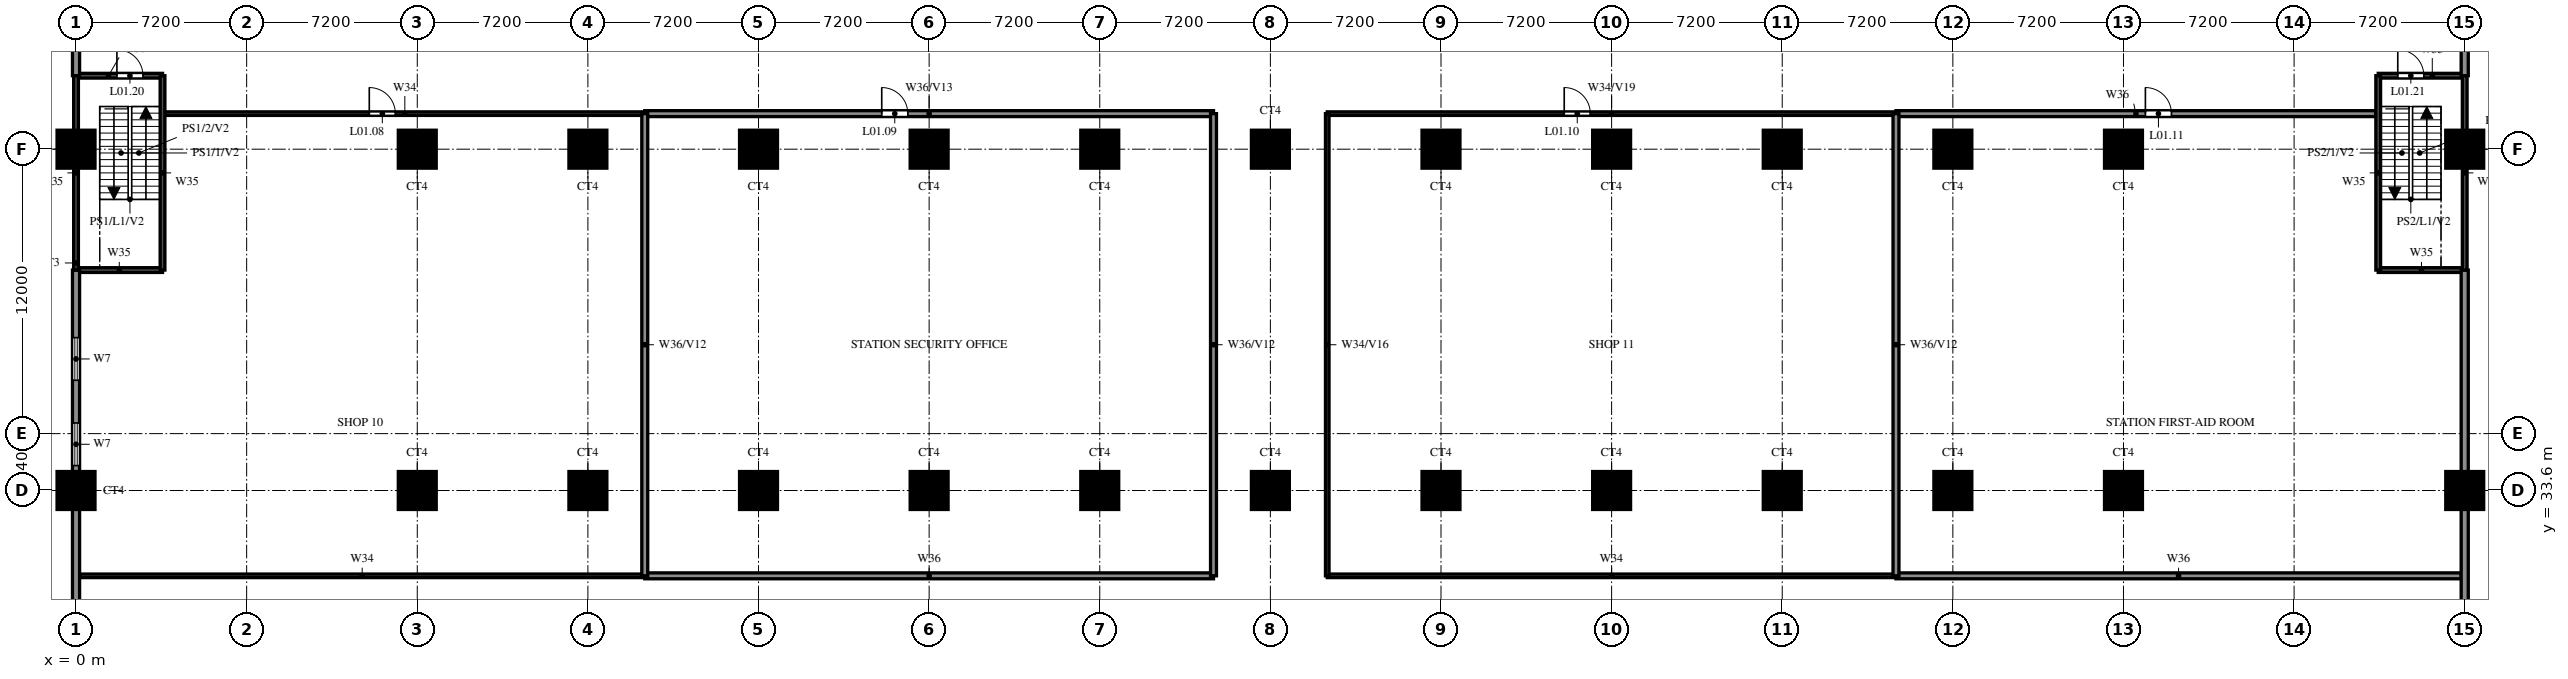
"""IFC4 building model, lengths in metres.
Left out: names, types, materials, properties, quantities, classifications, styles, units other than length and angle.
Written with IfcOpenShell. Run it as: python <this file> out.ifc"""

import sys

from ifc_helpers import new_model, si_unit, direction, frame, frame_2d, origin, origin_2d, place, context, subcontext, project, spatial, rectangle, circle, extrude, source, transform, mapped, element, fill, save


model = new_model("IFC4")
c1 = context("Model", 3, precision=1e-05, world=origin(), true_north=direction((0.0, 1.0)))
c2 = subcontext(c1, "Body", "Model", "MODEL_VIEW")
j1 = project(units=[si_unit("LENGTHUNIT", "METRE"), si_unit("PLANEANGLEUNIT", "RADIAN")], contexts=[c1])
p1 = place(None, origin())
s1 = spatial("IfcSite", under=j1, at=p1, CompositionType="ELEMENT")
p2 = place(p1, origin())
s2 = spatial("IfcBuilding", under=s1, at=p2, CompositionType="ELEMENT")
p3 = place(p2, frame((0.0, 0.0, 7.8)))
s3 = spatial("IfcBuildingStorey", under=s2, at=p3, CompositionType="ELEMENT", Elevation=7.8)
m1 = source(origin(), c2, "Body", "SweptSolid", [
    extrude(circle(Radius=0.8, at=origin_2d()), origin(), (0.0, 0.0, 1.0), 5.0),
])
for number, where, z_axis, x_axis in (
    (1, (0.0, 33.6, 0.0), (0.0, 0.0, 1.0), (1.0, 0.0, 0.0)),
    (2, (14.4, 33.6, 0.0), (0.0, 0.0, 1.0), (1.0, 0.0, 0.0)),
    (3, (21.6, 33.6, 0.0), (0.0, 0.0, 1.0), (1.0, 0.0, 0.0)),
    (4, (28.8, 33.6, 0.0), (0.0, 0.0, 1.0), (1.0, 0.0, 0.0)),
    (5, (36.0, 33.6, 0.0), (0.0, 0.0, 1.0), (1.0, 0.0, 0.0)),
    (6, (43.2, 33.6, 0.0), (0.0, 0.0, 1.0), (1.0, 0.0, 0.0)),
    (7, (50.4, 33.6, 0.0), (0.0, 0.0, 1.0), (1.0, 0.0, 0.0)),
    (8, (57.6, 33.6, 0.0), (0.0, 0.0, 1.0), (1.0, 0.0, 0.0)),
    (9, (64.8, 33.6, 0.0), (0.0, 0.0, 1.0), (1.0, 0.0, 0.0)),
    (10, (72.0, 33.6, 0.0), (0.0, 0.0, 1.0), (1.0, 0.0, 0.0)),
    (11, (79.2, 33.6, 0.0), (0.0, 0.0, 1.0), (1.0, 0.0, 0.0)),
    (12, (86.4, 33.6, 0.0), (0.0, 0.0, 1.0), (1.0, 0.0, 0.0)),
    (13, (100.8, 33.6, 0.0), (0.0, 0.0, 1.0), (1.0, 0.0, 0.0)),
    (14, (0.0, 48.0, 0.0), (0.0, 0.0, 1.0), (1.0, 0.0, 0.0)),
    (15, (14.4, 48.0, 0.0), (0.0, 0.0, 1.0), (1.0, 0.0, 0.0)),
    (16, (21.6, 48.0, 0.0), (0.0, 0.0, 1.0), (1.0, 0.0, 0.0)),
    (17, (28.8, 48.0, 0.0), (0.0, 0.0, 1.0), (1.0, 0.0, 0.0)),
    (18, (36.0, 48.0, 0.0), (0.0, 0.0, 1.0), (1.0, 0.0, 0.0)),
    (19, (43.2, 48.0, 0.0), (0.0, 0.0, 1.0), (1.0, 0.0, 0.0)),
    (20, (50.4, 48.0, 0.0), (0.0, 0.0, 1.0), (1.0, 0.0, 0.0)),
    (21, (57.6, 48.0, 0.0), (0.0, 0.0, 1.0), (1.0, 0.0, 0.0)),
    (22, (64.8, 48.0, 0.0), (0.0, 0.0, 1.0), (1.0, 0.0, 0.0)),
    (23, (72.0, 48.0, 0.0), (0.0, 0.0, 1.0), (1.0, 0.0, 0.0)),
    (24, (79.2, 48.0, 0.0), (0.0, 0.0, 1.0), (1.0, 0.0, 0.0)),
    (25, (86.4, 48.0, 0.0), (0.0, 0.0, 1.0), (1.0, 0.0, 0.0)),
    (26, (100.8, 48.0, 0.0), (0.0, 0.0, 1.0), (1.0, 0.0, 0.0)),
):
    element("IfcColumn", number, at=place(p3, frame(where, z_axis=z_axis, x_axis=x_axis)), inside=s3, PredefinedType="COLUMN", context=c2, shape_type="MappedRepresentation", body=[
        mapped(m1, transform((0.0, 0.0, 0.0))),
    ])
p4 = place(p3, frame((0.15, 30.0, 0.0), z_axis=(0.0, 0.0, 1.0), x_axis=(1.0, 0.0, 0.0)))
e27 = element("IfcWall", 27, at=p4, inside=s3, PredefinedType="PARTITIONING", context=c2, shape_type="SweptSolid", body=[
    extrude(rectangle(XDim=23.85, YDim=0.15, at=frame_2d((11.925, 0.0))), origin(), (0.0, 0.0, 1.0), 3.8),
])
p5 = place(p3, frame((52.8, 30.0, 0.0), z_axis=(0.0, 0.0, 1.0), x_axis=(1.0, 0.0, 0.0)))
e28 = element("IfcWall", 28, at=p5, inside=s3, PredefinedType="PARTITIONING", context=c2, shape_type="SweptSolid", body=[
    extrude(rectangle(XDim=24.0, YDim=0.15, at=frame_2d((12.0, 0.0))), origin(), (0.0, 0.0, 1.0), 3.8),
])
p6 = place(p3, frame((24.0, 30.0, 0.0), z_axis=(0.0, 0.0, 1.0), x_axis=(1.0, 0.0, 0.0)))
e29 = element("IfcWall", 29, at=p6, inside=s3, PredefinedType="SOLIDWALL", context=c2, shape_type="SweptSolid", body=[
    extrude(rectangle(XDim=24.0, YDim=0.25, at=frame_2d((12.0, 0.0))), origin(), (0.0, 0.0, 1.0), 3.8),
])
p7 = place(p3, frame((76.8, 30.0, 0.0), z_axis=(0.0, 0.0, 1.0), x_axis=(1.0, 0.0, 0.0)))
e30 = element("IfcWall", 30, at=p7, inside=s3, PredefinedType="SOLIDWALL", context=c2, shape_type="SweptSolid", body=[
    extrude(rectangle(XDim=23.85, YDim=0.25, at=frame_2d((11.925, 0.0))), origin(), (0.0, 0.0, 1.0), 3.8),
])
p8 = place(p3, frame((0.0, 42.9, 0.0), z_axis=(0.0, 0.0, 1.0), x_axis=(1.0, 0.0, 0.0)))
e31 = element("IfcWall", 31, at=p8, inside=s3, PredefinedType="SOLIDWALL", context=c2, shape_type="SweptSolid", body=[
    extrude(rectangle(XDim=3.65, YDim=0.2, at=frame_2d((1.825, 0.0))), origin(), (0.0, 0.0, 1.0), 5.0),
])
p9 = place(p3, frame((97.15, 42.9, 0.0), z_axis=(0.0, 0.0, 1.0), x_axis=(1.0, 0.0, 0.0)))
e32 = element("IfcWall", 32, at=p9, inside=s3, PredefinedType="SOLIDWALL", context=c2, shape_type="SweptSolid", body=[
    extrude(rectangle(XDim=3.65, YDim=0.2, at=frame_2d((1.825, 0.0))), origin(), (0.0, 0.0, 1.0), 5.0),
])
p10 = place(p3, frame((3.75, 49.5, 0.0), z_axis=(0.0, 0.0, 1.0), x_axis=(1.0, 0.0, 0.0)))
e33 = element("IfcWall", 33, at=p10, inside=s3, PredefinedType="PARTITIONING", context=c2, shape_type="SweptSolid", body=[
    extrude(rectangle(XDim=20.25, YDim=0.15, at=frame_2d((10.125, 0.0))), origin(), (0.0, 0.0, 1.0), 3.8),
])
p11 = place(p10, frame((8.625, 0.0, 0.0)))
e34 = element("IfcOpeningElement", 34, at=p11, cuts=e33, PredefinedType="OPENING", context=c2, shape_type="SweptSolid", body=[
    extrude(rectangle(XDim=1.1, YDim=2.1, at=frame_2d((0.55, 1.05))), frame((0.0, 0.085, 0.0), z_axis=(0.0, -1.0, 0.0), x_axis=(1.0, 0.0, 0.0)), (0.0, 0.0, 1.0), 0.17),
])
p12 = place(p3, frame((52.8, 49.5, 0.0), z_axis=(0.0, 0.0, 1.0), x_axis=(1.0, 0.0, 0.0)))
e35 = element("IfcWall", 35, at=p12, inside=s3, PredefinedType="PARTITIONING", context=c2, shape_type="SweptSolid", body=[
    extrude(rectangle(XDim=24.0, YDim=0.15, at=frame_2d((12.0, 0.0))), origin(), (0.0, 0.0, 1.0), 5.0),
])
p13 = place(p12, frame((10.0, 0.0, 0.0)))
e36 = element("IfcOpeningElement", 36, at=p13, cuts=e35, PredefinedType="OPENING", context=c2, shape_type="SweptSolid", body=[
    extrude(rectangle(XDim=1.1, YDim=2.1, at=frame_2d((0.55, 1.05))), frame((0.0, 0.085, 0.0), z_axis=(0.0, -1.0, 0.0), x_axis=(1.0, 0.0, 0.0)), (0.0, 0.0, 1.0), 0.17),
])
p14 = place(p3, frame((24.0, 49.5, 0.0), z_axis=(0.0, 0.0, 1.0), x_axis=(1.0, 0.0, 0.0)))
e37 = element("IfcWall", 37, at=p14, inside=s3, PredefinedType="SOLIDWALL", context=c2, shape_type="SweptSolid", body=[
    extrude(rectangle(XDim=24.0, YDim=0.25, at=frame_2d((12.0, 0.0))), origin(), (0.0, 0.0, 1.0), 5.0),
])
p15 = place(p14, frame((10.0, 0.0, 0.0)))
e38 = element("IfcOpeningElement", 38, at=p15, cuts=e37, PredefinedType="OPENING", context=c2, shape_type="SweptSolid", body=[
    extrude(rectangle(XDim=1.1, YDim=2.1, at=frame_2d((0.55, 1.05))), frame((0.0, 0.135, 0.0), z_axis=(0.0, -1.0, 0.0), x_axis=(1.0, 0.0, 0.0)), (0.0, 0.0, 1.0), 0.27),
])
p16 = place(p3, frame((76.8, 49.5, 0.0), z_axis=(0.0, 0.0, 1.0), x_axis=(1.0, 0.0, 0.0)))
e39 = element("IfcWall", 39, at=p16, inside=s3, PredefinedType="SOLIDWALL", context=c2, shape_type="SweptSolid", body=[
    extrude(rectangle(XDim=20.25, YDim=0.25, at=frame_2d((10.125, 0.0))), origin(), (0.0, 0.0, 1.0), 3.8),
])
p17 = place(p16, frame((10.525, 0.0, 0.0)))
e40 = element("IfcOpeningElement", 40, at=p17, cuts=e39, PredefinedType="OPENING", context=c2, shape_type="SweptSolid", body=[
    extrude(rectangle(XDim=1.1, YDim=2.1, at=frame_2d((0.55, 1.05))), frame((0.0, 0.135, 0.0), z_axis=(0.0, -1.0, 0.0), x_axis=(1.0, 0.0, 0.0)), (0.0, 0.0, 1.0), 0.27),
])
p18 = place(p3, frame((0.0, 51.1, 0.0), z_axis=(0.0, 0.0, 1.0), x_axis=(1.0, 0.0, 0.0)))
e41 = element("IfcWall", 41, at=p18, inside=s3, PredefinedType="SOLIDWALL", context=c2, shape_type="SweptSolid", body=[
    extrude(rectangle(XDim=3.65, YDim=0.2, at=frame_2d((1.825, 0.0))), origin(), (0.0, 0.0, 1.0), 5.0),
])
p19 = place(p18, frame((1.725, 0.0, 0.0)))
e42 = element("IfcOpeningElement", 42, at=p19, cuts=e41, PredefinedType="OPENING", context=c2, shape_type="SweptSolid", body=[
    extrude(rectangle(XDim=1.1, YDim=2.1, at=frame_2d((0.55, 1.05))), frame((0.0, 0.11, 0.0), z_axis=(0.0, -1.0, 0.0), x_axis=(1.0, 0.0, 0.0)), (0.0, 0.0, 1.0), 0.22),
])
p20 = place(p3, frame((97.15, 51.1, 0.0), z_axis=(0.0, 0.0, 1.0), x_axis=(1.0, 0.0, 0.0)))
e43 = element("IfcWall", 43, at=p20, inside=s3, PredefinedType="SOLIDWALL", context=c2, shape_type="SweptSolid", body=[
    extrude(rectangle(XDim=3.65, YDim=0.2, at=frame_2d((1.825, 0.0))), origin(), (0.0, 0.0, 1.0), 5.0),
])
p21 = place(p20, frame((0.825, 0.0, 0.0)))
e44 = element("IfcOpeningElement", 44, at=p21, cuts=e43, PredefinedType="OPENING", context=c2, shape_type="SweptSolid", body=[
    extrude(rectangle(XDim=1.1, YDim=2.1, at=frame_2d((0.55, 1.05))), frame((0.0, 0.11, 0.0), z_axis=(0.0, -1.0, 0.0), x_axis=(1.0, 0.0, 0.0)), (0.0, 0.0, 1.0), 0.22),
])
p22 = place(p3, frame((0.0, 0.0, 0.0), z_axis=(0.0, 0.0, 1.0), x_axis=(0.0, 1.0, 0.0)))
e45 = element("IfcWall", 45, at=p22, inside=s3, PredefinedType="SOLIDWALL", context=c2, shape_type="SweptSolid", body=[
    extrude(rectangle(XDim=42.9, YDim=0.3, at=frame_2d((21.45, 0.0))), origin(), (0.0, 0.0, 1.0), 5.0),
])
p23 = place(p22, frame((34.65, 0.0, 0.6)))
e46 = element("IfcOpeningElement", 46, at=p23, cuts=e45, PredefinedType="OPENING", context=c2, shape_type="SweptSolid", body=[
    extrude(rectangle(XDim=1.8, YDim=2.4, at=frame_2d((0.9, 1.2))), frame((0.0, 0.16, 0.0), z_axis=(0.0, -1.0, 0.0), x_axis=(1.0, 0.0, 0.0)), (0.0, 0.0, 1.0), 0.32),
])
p24 = place(p22, frame((38.25, 0.0, 0.6)))
e47 = element("IfcOpeningElement", 47, at=p24, cuts=e45, PredefinedType="OPENING", context=c2, shape_type="SweptSolid", body=[
    extrude(rectangle(XDim=1.8, YDim=2.4, at=frame_2d((0.9, 1.2))), frame((0.0, 0.16, 0.0), z_axis=(0.0, -1.0, 0.0), x_axis=(1.0, 0.0, 0.0)), (0.0, 0.0, 1.0), 0.32),
])
p25 = place(p3, frame((0.0, 51.1, 0.0), z_axis=(0.0, 0.0, 1.0), x_axis=(0.0, 1.0, 0.0)))
e48 = element("IfcWall", 48, at=p25, inside=s3, PredefinedType="SOLIDWALL", context=c2, shape_type="SweptSolid", body=[
    extrude(rectangle(XDim=3.2, YDim=0.3, at=frame_2d((1.6, 0.0))), origin(), (0.0, 0.0, 1.0), 5.0),
])
for number, where, z_axis, x_axis in (
    (49, (0.0, 42.9, 0.0), (0.0, 0.0, 1.0), (0.0, 1.0, 0.0)),
    (50, (3.65, 42.9, 0.0), (0.0, 0.0, 1.0), (0.0, 1.0, 0.0)),
):
    element("IfcWall", number, at=place(p3, frame(where, z_axis=z_axis, x_axis=x_axis)), inside=s3, PredefinedType="SOLIDWALL", context=c2, shape_type="SweptSolid", body=[
        extrude(rectangle(XDim=8.2, YDim=0.2, at=frame_2d((4.1, 0.0))), origin(), (0.0, 0.0, 1.0), 5.0),
    ])
for number, where, z_axis, x_axis in (
    (51, (24.0, 30.0, 0.0), (0.0, 0.0, 1.0), (0.0, 1.0, 0.0)),
    (52, (48.0, 30.0, 0.0), (0.0, 0.0, 1.0), (0.0, 1.0, 0.0)),
):
    element("IfcWall", number, at=place(p3, frame(where, z_axis=z_axis, x_axis=x_axis)), inside=s3, PredefinedType="SOLIDWALL", context=c2, shape_type="SweptSolid", body=[
        extrude(rectangle(XDim=19.5, YDim=0.25, at=frame_2d((9.75, 0.0))), origin(), (0.0, 0.0, 1.0), 4.1),
    ])
p26 = place(p3, frame((52.8, 30.0, 0.0), z_axis=(0.0, 0.0, 1.0), x_axis=(0.0, 1.0, 0.0)))
e53 = element("IfcWall", 53, at=p26, inside=s3, PredefinedType="PARTITIONING", context=c2, shape_type="SweptSolid", body=[
    extrude(rectangle(XDim=19.5, YDim=0.15, at=frame_2d((9.75, 0.0))), origin(), (0.0, 0.0, 1.0), 4.1),
])
p27 = place(p3, frame((76.8, 30.0, 0.0), z_axis=(0.0, 0.0, 1.0), x_axis=(0.0, 1.0, 0.0)))
e54 = element("IfcWall", 54, at=p27, inside=s3, PredefinedType="SOLIDWALL", context=c2, shape_type="SweptSolid", body=[
    extrude(rectangle(XDim=19.5, YDim=0.25, at=frame_2d((9.75, 0.0))), origin(), (0.0, 0.0, 1.0), 4.1),
])
p28 = place(p3, frame((97.15, 42.9, 0.0), z_axis=(0.0, 0.0, 1.0), x_axis=(0.0, 1.0, 0.0)))
e55 = element("IfcWall", 55, at=p28, inside=s3, PredefinedType="SOLIDWALL", context=c2, shape_type="SweptSolid", body=[
    extrude(rectangle(XDim=8.2, YDim=0.2, at=frame_2d((4.1, 0.0))), origin(), (0.0, 0.0, 1.0), 5.0),
])
p29 = place(p3, frame((100.8, 0.0, 0.0), z_axis=(0.0, 0.0, 1.0), x_axis=(0.0, 1.0, 0.0)))
e56 = element("IfcWall", 56, at=p29, inside=s3, PredefinedType="SOLIDWALL", context=c2, shape_type="SweptSolid", body=[
    extrude(rectangle(XDim=42.9, YDim=0.3, at=frame_2d((21.45, 0.0))), origin(), (0.0, 0.0, 1.0), 5.0),
])
p30 = place(p3, frame((100.8, 51.1, 0.0), z_axis=(0.0, 0.0, 1.0), x_axis=(0.0, 1.0, 0.0)))
e57 = element("IfcWall", 57, at=p30, inside=s3, PredefinedType="SOLIDWALL", context=c2, shape_type="SweptSolid", body=[
    extrude(rectangle(XDim=3.2, YDim=0.3, at=frame_2d((1.6, 0.0))), origin(), (0.0, 0.0, 1.0), 5.0),
])
p31 = place(p3, frame((100.8, 42.9, 0.0), z_axis=(0.0, 0.0, 1.0), x_axis=(0.0, 1.0, 0.0)))
e58 = element("IfcWall", 58, at=p31, inside=s3, PredefinedType="SOLIDWALL", context=c2, shape_type="SweptSolid", body=[
    extrude(rectangle(XDim=8.2, YDim=0.2, at=frame_2d((4.1, 0.0))), origin(), (0.0, 0.0, 1.0), 5.0),
])
p32 = place(p11, origin())
e59 = element("IfcDoor", 59, at=p32, inside=s3, OperationType="SINGLE_SWING_LEFT", PredefinedType="DOOR", context=c2, shape_type="SweptSolid", body=[
    extrude(rectangle(XDim=1.1, YDim=2.1, at=frame_2d((0.55, 1.05))), frame((0.0, 0.025, 0.0), z_axis=(0.0, -1.0, 0.0), x_axis=(1.0, 0.0, 0.0)), (0.0, 0.0, 1.0), 0.05),
])
fill(e34, e59)
p33 = place(p15, origin())
e60 = element("IfcDoor", 60, at=p33, inside=s3, OperationType="SINGLE_SWING_LEFT", PredefinedType="DOOR", context=c2, shape_type="SweptSolid", body=[
    extrude(rectangle(XDim=1.1, YDim=2.1, at=frame_2d((0.55, 1.05))), frame((0.0, 0.025, 0.0), z_axis=(0.0, -1.0, 0.0), x_axis=(1.0, 0.0, 0.0)), (0.0, 0.0, 1.0), 0.05),
])
fill(e38, e60)
p34 = place(p13, origin())
e61 = element("IfcDoor", 61, at=p34, inside=s3, OperationType="SINGLE_SWING_LEFT", PredefinedType="DOOR", context=c2, shape_type="SweptSolid", body=[
    extrude(rectangle(XDim=1.1, YDim=2.1, at=frame_2d((0.55, 1.05))), frame((0.0, 0.025, 0.0), z_axis=(0.0, -1.0, 0.0), x_axis=(1.0, 0.0, 0.0)), (0.0, 0.0, 1.0), 0.05),
])
fill(e36, e61)
p35 = place(p17, origin())
e62 = element("IfcDoor", 62, at=p35, inside=s3, OperationType="SINGLE_SWING_RIGHT", PredefinedType="DOOR", context=c2, shape_type="SweptSolid", body=[
    extrude(rectangle(XDim=1.1, YDim=2.1, at=frame_2d((0.55, 1.05))), frame((0.0, 0.025, 0.0), z_axis=(0.0, -1.0, 0.0), x_axis=(1.0, 0.0, 0.0)), (0.0, 0.0, 1.0), 0.05),
])
fill(e40, e62)
p36 = place(p19, origin())
e63 = element("IfcDoor", 63, at=p36, inside=s3, OperationType="SINGLE_SWING_RIGHT", PredefinedType="DOOR", context=c2, shape_type="SweptSolid", body=[
    extrude(rectangle(XDim=1.1, YDim=2.1, at=frame_2d((0.55, 1.05))), frame((0.0, 0.025, 0.0), z_axis=(0.0, -1.0, 0.0), x_axis=(1.0, 0.0, 0.0)), (0.0, 0.0, 1.0), 0.05),
])
fill(e42, e63)
p37 = place(p21, origin())
e64 = element("IfcDoor", 64, at=p37, inside=s3, OperationType="SINGLE_SWING_LEFT", PredefinedType="DOOR", context=c2, shape_type="SweptSolid", body=[
    extrude(rectangle(XDim=1.1, YDim=2.1, at=frame_2d((0.55, 1.05))), frame((0.0, 0.025, 0.0), z_axis=(0.0, -1.0, 0.0), x_axis=(1.0, 0.0, 0.0)), (0.0, 0.0, 1.0), 0.05),
])
fill(e44, e64)
p38 = place(p23, origin())
e65 = element("IfcWindow", 65, at=p38, inside=s3, PartitioningType="DOUBLE_PANEL_VERTICAL", PredefinedType="WINDOW", context=c2, shape_type="SweptSolid", body=[
    extrude(rectangle(XDim=1.8, YDim=2.4, at=frame_2d((0.9, 1.2))), frame((0.0, 0.03, 0.0), z_axis=(0.0, -1.0, 0.0), x_axis=(1.0, 0.0, 0.0)), (0.0, 0.0, 1.0), 0.06),
])
fill(e46, e65)
p39 = place(p24, origin())
e66 = element("IfcWindow", 66, at=p39, inside=s3, PartitioningType="DOUBLE_PANEL_VERTICAL", PredefinedType="WINDOW", context=c2, shape_type="SweptSolid", body=[
    extrude(rectangle(XDim=1.8, YDim=2.4, at=frame_2d((0.9, 1.2))), frame((0.0, 0.03, 0.0), z_axis=(0.0, -1.0, 0.0), x_axis=(1.0, 0.0, 0.0)), (0.0, 0.0, 1.0), 0.06),
])
fill(e47, e66)
save(model, sys.argv[1])
